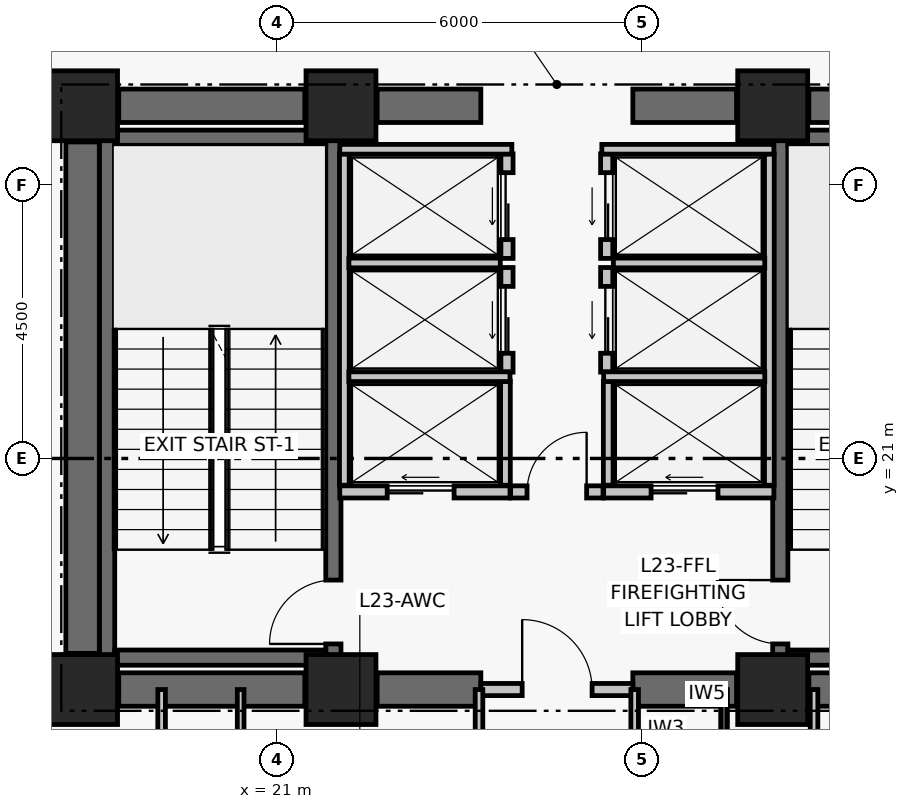
"""IFC4 building model, lengths in metres.
Left out: names, types, materials, properties, quantities, classifications, styles, units other than length and angle.
Written with IfcOpenShell. Run it as: python <this file> out.ifc"""

import sys

from ifc_helpers import new_model, si_unit, direction, frame, frame_2d, origin, origin_2d, place, context, subcontext, project, spatial, rectangle, extrude, element, fill, save


model = new_model("IFC4")
c1 = context("Model", 3, precision=1e-05, world=origin(), true_north=direction((0.0, 1.0)))
c2 = subcontext(c1, "Body", "Model", "MODEL_VIEW")
j1 = project(units=[si_unit("LENGTHUNIT", "METRE"), si_unit("PLANEANGLEUNIT", "RADIAN")], contexts=[c1])
p1 = place(None, origin())
s1 = spatial("IfcSite", under=j1, at=p1, CompositionType="ELEMENT")
p2 = place(p1, origin())
s2 = spatial("IfcBuilding", under=s1, at=p2, CompositionType="ELEMENT")
p3 = place(p2, frame((0.0, 0.0, 96.54)))
s3 = spatial("IfcBuildingStorey", under=s2, at=p3, CompositionType="ELEMENT", Elevation=96.54)
for number, where, z_axis, x_axis in (
    (1, (17.8, 17.2, 0.0), (0.0, 0.0, 1.0), (1.0, 0.0, 0.0)),
    (2, (22.05, 17.2, 0.0), (0.0, 0.0, 1.0), (1.0, 0.0, 0.0)),
    (3, (29.15, 17.2, 0.0), (0.0, 0.0, 1.0), (1.0, 0.0, 0.0)),
    (4, (17.8, 26.8, 0.0), (0.0, 0.0, 1.0), (1.0, 0.0, 0.0)),
    (5, (22.05, 26.8, 0.0), (0.0, 0.0, 1.0), (1.0, 0.0, 0.0)),
    (6, (29.15, 26.8, 0.0), (0.0, 0.0, 1.0), (1.0, 0.0, 0.0)),
):
    element("IfcColumn", number, at=place(p3, frame(where, z_axis=z_axis, x_axis=x_axis)), inside=s3, PredefinedType="COLUMN", context=c2, shape_type="SweptSolid", body=[
        extrude(rectangle(XDim=1.15, YDim=1.15, at=origin_2d()), origin(), (0.0, 0.0, 1.0), 3.72),
    ])
p4 = place(p3, frame((18.395, 17.2, 0.0), z_axis=(0.0, 0.0, 1.0), x_axis=(1.0, 0.0, 0.0)))
e7 = element("IfcWall", 7, at=p4, inside=s3, PredefinedType="SHEAR", context=c2, shape_type="SweptSolid", body=[
    extrude(rectangle(XDim=3.06, YDim=0.55, at=frame_2d((1.53, 0.0))), origin(), (0.0, 0.0, 1.0), 3.47),
])
p5 = place(p3, frame((22.645, 17.2, 0.0), z_axis=(0.0, 0.0, 1.0), x_axis=(1.0, 0.0, 0.0)))
e8 = element("IfcWall", 8, at=p5, inside=s3, PredefinedType="SHEAR", context=c2, shape_type="SweptSolid", body=[
    extrude(rectangle(XDim=1.705, YDim=0.55, at=frame_2d((0.853, 0.0))), origin(), (0.0, 0.0, 1.0), 3.47),
])
p6 = place(p3, frame((26.85, 17.2, 0.0), z_axis=(0.0, 0.0, 1.0), x_axis=(1.0, 0.0, 0.0)))
e9 = element("IfcWall", 9, at=p6, inside=s3, PredefinedType="SHEAR", context=c2, shape_type="SweptSolid", body=[
    extrude(rectangle(XDim=1.705, YDim=0.55, at=frame_2d((0.853, 0.0))), origin(), (0.0, 0.0, 1.0), 3.47),
])
p7 = place(p3, frame((29.745, 17.2, 0.0), z_axis=(0.0, 0.0, 1.0), x_axis=(1.0, 0.0, 0.0)))
e10 = element("IfcWall", 10, at=p7, inside=s3, PredefinedType="SHEAR", context=c2, shape_type="SweptSolid", body=[
    extrude(rectangle(XDim=3.06, YDim=0.55, at=frame_2d((1.53, 0.0))), origin(), (0.0, 0.0, 1.0), 3.47),
])
p8 = place(p3, frame((18.395, 26.8, 0.0), z_axis=(0.0, 0.0, 1.0), x_axis=(1.0, 0.0, 0.0)))
e11 = element("IfcWall", 11, at=p8, inside=s3, PredefinedType="SHEAR", context=c2, shape_type="SweptSolid", body=[
    extrude(rectangle(XDim=3.06, YDim=0.55, at=frame_2d((1.53, 0.0))), origin(), (0.0, 0.0, 1.0), 3.47),
])
p9 = place(p3, frame((22.645, 26.8, 0.0), z_axis=(0.0, 0.0, 1.0), x_axis=(1.0, 0.0, 0.0)))
e12 = element("IfcWall", 12, at=p9, inside=s3, PredefinedType="SHEAR", context=c2, shape_type="SweptSolid", body=[
    extrude(rectangle(XDim=1.705, YDim=0.55, at=frame_2d((0.853, 0.0))), origin(), (0.0, 0.0, 1.0), 3.47),
])
p10 = place(p3, frame((26.85, 26.8, 0.0), z_axis=(0.0, 0.0, 1.0), x_axis=(1.0, 0.0, 0.0)))
e13 = element("IfcWall", 13, at=p10, inside=s3, PredefinedType="SHEAR", context=c2, shape_type="SweptSolid", body=[
    extrude(rectangle(XDim=1.705, YDim=0.55, at=frame_2d((0.853, 0.0))), origin(), (0.0, 0.0, 1.0), 3.47),
])
p11 = place(p3, frame((29.745, 26.8, 0.0), z_axis=(0.0, 0.0, 1.0), x_axis=(1.0, 0.0, 0.0)))
e14 = element("IfcWall", 14, at=p11, inside=s3, PredefinedType="SHEAR", context=c2, shape_type="SweptSolid", body=[
    extrude(rectangle(XDim=3.06, YDim=0.55, at=frame_2d((1.53, 0.0))), origin(), (0.0, 0.0, 1.0), 3.47),
])
p12 = place(p3, frame((17.8, 17.795, 0.0), z_axis=(0.0, 0.0, 1.0), x_axis=(0.0, 1.0, 0.0)))
e15 = element("IfcWall", 15, at=p12, inside=s3, PredefinedType="SHEAR", context=c2, shape_type="SweptSolid", body=[
    extrude(rectangle(XDim=8.41, YDim=0.55, at=frame_2d((4.205, 0.0))), origin(), (0.0, 0.0, 1.0), 3.47),
])
p13 = place(p3, frame((18.204, 17.6, 0.0), z_axis=(0.0, 0.0, 1.0), x_axis=(0.0, 1.0, 0.0)))
e16 = element("IfcWall", 16, at=p13, inside=s3, PredefinedType="SHEAR", context=c2, shape_type="SweptSolid", body=[
    extrude(rectangle(XDim=8.8, YDim=0.25, at=frame_2d((4.4, 0.0))), origin(), (0.0, 0.0, 1.0), 3.47),
])
p14 = place(p3, frame((21.925, 17.6, 0.0), z_axis=(0.0, 0.0, 1.0), x_axis=(0.0, 1.0, 0.0)))
e17 = element("IfcWall", 17, at=p14, inside=s3, PredefinedType="SHEAR", context=c2, shape_type="SweptSolid", body=[
    extrude(rectangle(XDim=8.8, YDim=0.25, at=frame_2d((4.4, 0.0))), origin(), (0.0, 0.0, 1.0), 3.47),
])
p15 = place(p14, frame((0.35, 0.0, 0.0)))
e18 = element("IfcOpeningElement", 18, at=p15, cuts=e17, PredefinedType="OPENING", context=c2, shape_type="SweptSolid", body=[
    extrude(rectangle(XDim=1.05, YDim=2.08, at=frame_2d((0.525, 1.04))), frame((0.0, 0.135, 0.0), z_axis=(0.0, -1.0, 0.0), x_axis=(1.0, 0.0, 0.0)), (0.0, 0.0, 1.0), 0.27),
])
for number, where, z_axis, x_axis in (
    (19, (18.329, 17.725, 0.0), (0.0, 0.0, 1.0), (1.0, 0.0, 0.0)),
    (20, (18.329, 26.275, 0.0), (0.0, 0.0, 1.0), (1.0, 0.0, 0.0)),
):
    element("IfcWall", number, at=place(p3, frame(where, z_axis=z_axis, x_axis=x_axis)), inside=s3, PredefinedType="SHEAR", context=c2, shape_type="SweptSolid", body=[
        extrude(rectangle(XDim=3.471, YDim=0.25, at=frame_2d((1.735, 0.0))), origin(), (0.0, 0.0, 1.0), 3.47),
    ])
p16 = place(p3, frame((29.275, 17.6, 0.0), z_axis=(0.0, 0.0, 1.0), x_axis=(0.0, 1.0, 0.0)))
e21 = element("IfcWall", 21, at=p16, inside=s3, PredefinedType="SHEAR", context=c2, shape_type="SweptSolid", body=[
    extrude(rectangle(XDim=8.8, YDim=0.25, at=frame_2d((4.4, 0.0))), origin(), (0.0, 0.0, 1.0), 3.47),
])
p17 = place(p16, frame((0.35, 0.0, 0.0)))
e22 = element("IfcOpeningElement", 22, at=p17, cuts=e21, PredefinedType="OPENING", context=c2, shape_type="SweptSolid", body=[
    extrude(rectangle(XDim=1.05, YDim=2.08, at=frame_2d((0.525, 1.04))), frame((0.0, 0.135, 0.0), z_axis=(0.0, -1.0, 0.0), x_axis=(1.0, 0.0, 0.0)), (0.0, 0.0, 1.0), 0.27),
])
for number, where, z_axis, x_axis in (
    (23, (29.4, 17.725, 0.0), (0.0, 0.0, 1.0), (1.0, 0.0, 0.0)),
    (24, (29.4, 26.275, 0.0), (0.0, 0.0, 1.0), (1.0, 0.0, 0.0)),
):
    element("IfcWall", number, at=place(p3, frame(where, z_axis=z_axis, x_axis=x_axis)), inside=s3, PredefinedType="SHEAR", context=c2, shape_type="SweptSolid", body=[
        extrude(rectangle(XDim=3.471, YDim=0.25, at=frame_2d((1.736, 0.0))), origin(), (0.0, 0.0, 1.0), 3.47),
    ])
p18 = place(p3, frame((24.35, 17.2, 0.0), z_axis=(0.0, 0.0, 1.0), x_axis=(1.0, 0.0, 0.0)))
e25 = element("IfcWall", 25, at=p18, inside=s3, PredefinedType="PARTITIONING", context=c2, shape_type="SweptSolid", body=[
    extrude(rectangle(XDim=2.5, YDim=0.2, at=frame_2d((1.25, 0.0))), origin(), (0.0, 0.0, 1.0), 2.6),
])
p19 = place(p18, frame((0.68, 0.0, 0.0)))
e26 = element("IfcOpeningElement", 26, at=p19, cuts=e25, PredefinedType="OPENING", context=c2, shape_type="SweptSolid", body=[
    extrude(rectangle(XDim=1.15, YDim=2.08, at=frame_2d((0.575, 1.04))), frame((0.0, 0.11, 0.0), z_axis=(0.0, -1.0, 0.0), x_axis=(1.0, 0.0, 0.0)), (0.0, 0.0, 1.0), 0.22),
])
p20 = place(p3, frame((24.84, 20.45, 0.0), z_axis=(0.0, 0.0, 1.0), x_axis=(1.0, 0.0, 0.0)))
e27 = element("IfcWall", 27, at=p20, inside=s3, PredefinedType="PARTITIONING", context=c2, shape_type="SweptSolid", body=[
    extrude(rectangle(XDim=1.52, YDim=0.2, at=frame_2d((0.76, 0.0))), origin(), (0.0, 0.0, 1.0), 3.47),
])
p21 = place(p20, frame((0.27, 0.0, 0.0)))
e28 = element("IfcOpeningElement", 28, at=p21, cuts=e27, PredefinedType="OPENING", context=c2, shape_type="SweptSolid", body=[
    extrude(rectangle(XDim=0.98, YDim=2.06, at=frame_2d((0.49, 1.03))), frame((0.0, 0.11, 0.0), z_axis=(0.0, -1.0, 0.0), x_axis=(1.0, 0.0, 0.0)), (0.0, 0.0, 1.0), 0.22),
])
p22 = place(p3, frame((22.03, 20.45, 0.0), z_axis=(0.0, 0.0, 1.0), x_axis=(1.0, 0.0, 0.0)))
e29 = element("IfcWall", 29, at=p22, inside=s3, PredefinedType="PARTITIONING", context=c2, shape_type="SweptSolid", body=[
    extrude(rectangle(XDim=2.8, YDim=0.2, at=frame_2d((1.4, 0.0))), origin(), (0.0, 0.0, 1.0), 3.47),
])
p23 = place(p22, frame((0.78, 0.0, 0.0)))
e30 = element("IfcOpeningElement", 30, at=p23, cuts=e29, PredefinedType="OPENING", context=c2, shape_type="SweptSolid", body=[
    extrude(rectangle(XDim=1.1, YDim=2.08, at=frame_2d((0.55, 1.04))), frame((0.0, 0.11, 0.0), z_axis=(0.0, -1.0, 0.0), x_axis=(1.0, 0.0, 0.0)), (0.0, 0.0, 1.0), 0.22),
])
p24 = place(p3, frame((26.37, 20.45, 0.0), z_axis=(0.0, 0.0, 1.0), x_axis=(1.0, 0.0, 0.0)))
e31 = element("IfcWall", 31, at=p24, inside=s3, PredefinedType="PARTITIONING", context=c2, shape_type="SweptSolid", body=[
    extrude(rectangle(XDim=2.8, YDim=0.2, at=frame_2d((1.4, 0.0))), origin(), (0.0, 0.0, 1.0), 3.47),
])
p25 = place(p24, frame((0.78, 0.0, 0.0)))
e32 = element("IfcOpeningElement", 32, at=p25, cuts=e31, PredefinedType="OPENING", context=c2, shape_type="SweptSolid", body=[
    extrude(rectangle(XDim=1.1, YDim=2.08, at=frame_2d((0.55, 1.04))), frame((0.0, 0.11, 0.0), z_axis=(0.0, -1.0, 0.0), x_axis=(1.0, 0.0, 0.0)), (0.0, 0.0, 1.0), 0.22),
])
p26 = place(p3, frame((24.78, 22.42, 0.0), z_axis=(0.0, 0.0, 1.0), x_axis=(0.0, 1.0, 0.0)))
e33 = element("IfcWall", 33, at=p26, inside=s3, PredefinedType="PARTITIONING", context=c2, shape_type="SweptSolid", body=[
    extrude(rectangle(XDim=1.72, YDim=0.2, at=frame_2d((0.86, 0.0))), origin(), (0.0, 0.0, 1.0), 3.47),
])
p27 = place(p26, frame((0.31, 0.0, 0.0)))
e34 = element("IfcOpeningElement", 34, at=p27, cuts=e33, PredefinedType="OPENING", context=c2, shape_type="SweptSolid", body=[
    extrude(rectangle(XDim=1.1, YDim=2.08, at=frame_2d((0.55, 1.04))), frame((0.0, 0.11, 0.0), z_axis=(0.0, -1.0, 0.0), x_axis=(1.0, 0.0, 0.0)), (0.0, 0.0, 1.0), 0.22),
])
p28 = place(p3, frame((24.78, 24.29, 0.0), z_axis=(0.0, 0.0, 1.0), x_axis=(0.0, 1.0, 0.0)))
e35 = element("IfcWall", 35, at=p28, inside=s3, PredefinedType="PARTITIONING", context=c2, shape_type="SweptSolid", body=[
    extrude(rectangle(XDim=1.72, YDim=0.2, at=frame_2d((0.86, 0.0))), origin(), (0.0, 0.0, 1.0), 3.47),
])
p29 = place(p28, frame((0.31, 0.0, 0.0)))
e36 = element("IfcOpeningElement", 36, at=p29, cuts=e35, PredefinedType="OPENING", context=c2, shape_type="SweptSolid", body=[
    extrude(rectangle(XDim=1.1, YDim=2.08, at=frame_2d((0.55, 1.04))), frame((0.0, 0.11, 0.0), z_axis=(0.0, -1.0, 0.0), x_axis=(1.0, 0.0, 0.0)), (0.0, 0.0, 1.0), 0.22),
])
p30 = place(p3, frame((26.42, 22.42, 0.0), z_axis=(0.0, 0.0, 1.0), x_axis=(0.0, 1.0, 0.0)))
e37 = element("IfcWall", 37, at=p30, inside=s3, PredefinedType="PARTITIONING", context=c2, shape_type="SweptSolid", body=[
    extrude(rectangle(XDim=1.72, YDim=0.2, at=frame_2d((0.86, 0.0))), origin(), (0.0, 0.0, 1.0), 3.47),
])
p31 = place(p30, frame((0.31, 0.0, 0.0)))
e38 = element("IfcOpeningElement", 38, at=p31, cuts=e37, PredefinedType="OPENING", context=c2, shape_type="SweptSolid", body=[
    extrude(rectangle(XDim=1.1, YDim=2.08, at=frame_2d((0.55, 1.04))), frame((0.0, 0.11, 0.0), z_axis=(0.0, -1.0, 0.0), x_axis=(1.0, 0.0, 0.0)), (0.0, 0.0, 1.0), 0.22),
])
p32 = place(p3, frame((26.42, 24.29, 0.0), z_axis=(0.0, 0.0, 1.0), x_axis=(0.0, 1.0, 0.0)))
e39 = element("IfcWall", 39, at=p32, inside=s3, PredefinedType="PARTITIONING", context=c2, shape_type="SweptSolid", body=[
    extrude(rectangle(XDim=1.72, YDim=0.2, at=frame_2d((0.86, 0.0))), origin(), (0.0, 0.0, 1.0), 3.47),
])
p33 = place(p32, frame((0.31, 0.0, 0.0)))
e40 = element("IfcOpeningElement", 40, at=p33, cuts=e39, PredefinedType="OPENING", context=c2, shape_type="SweptSolid", body=[
    extrude(rectangle(XDim=1.1, YDim=2.08, at=frame_2d((0.55, 1.04))), frame((0.0, 0.11, 0.0), z_axis=(0.0, -1.0, 0.0), x_axis=(1.0, 0.0, 0.0)), (0.0, 0.0, 1.0), 0.22),
])
p34 = place(p3, frame((22.105, 20.56, 0.0), z_axis=(0.0, 0.0, 1.0), x_axis=(0.0, 1.0, 0.0)))
e41 = element("IfcWall", 41, at=p34, inside=s3, PredefinedType="PARTITIONING", context=c2, shape_type="SweptSolid", body=[
    extrude(rectangle(XDim=5.45, YDim=0.16, at=frame_2d((2.725, 0.0))), origin(), (0.0, 0.0, 1.0), 3.47),
])
p35 = place(p3, frame((24.755, 20.56, 0.0), z_axis=(0.0, 0.0, 1.0), x_axis=(0.0, 1.0, 0.0)))
e42 = element("IfcWall", 42, at=p35, inside=s3, PredefinedType="PARTITIONING", context=c2, shape_type="SweptSolid", body=[
    extrude(rectangle(XDim=1.71, YDim=0.16, at=frame_2d((0.855, 0.0))), origin(), (0.0, 0.0, 1.0), 3.47),
])
p36 = place(p3, frame((22.18, 22.345, 0.0), z_axis=(0.0, 0.0, 1.0), x_axis=(1.0, 0.0, 0.0)))
e43 = element("IfcWall", 43, at=p36, inside=s3, PredefinedType="PARTITIONING", context=c2, shape_type="SweptSolid", body=[
    extrude(rectangle(XDim=2.65, YDim=0.16, at=frame_2d((1.325, 0.0))), origin(), (0.0, 0.0, 1.0), 3.47),
])
p37 = place(p3, frame((22.18, 24.215, 0.0), z_axis=(0.0, 0.0, 1.0), x_axis=(1.0, 0.0, 0.0)))
e44 = element("IfcWall", 44, at=p37, inside=s3, PredefinedType="PARTITIONING", context=c2, shape_type="SweptSolid", body=[
    extrude(rectangle(XDim=2.49, YDim=0.16, at=frame_2d((1.245, 0.0))), origin(), (0.0, 0.0, 1.0), 3.47),
])
p38 = place(p3, frame((22.03, 26.085, 0.0), z_axis=(0.0, 0.0, 1.0), x_axis=(1.0, 0.0, 0.0)))
e45 = element("IfcWall", 45, at=p38, inside=s3, PredefinedType="PARTITIONING", context=c2, shape_type="SweptSolid", body=[
    extrude(rectangle(XDim=2.83, YDim=0.16, at=frame_2d((1.415, 0.0))), origin(), (0.0, 0.0, 1.0), 3.47),
])
p39 = place(p3, frame((29.095, 20.56, 0.0), z_axis=(0.0, 0.0, 1.0), x_axis=(0.0, 1.0, 0.0)))
e46 = element("IfcWall", 46, at=p39, inside=s3, PredefinedType="PARTITIONING", context=c2, shape_type="SweptSolid", body=[
    extrude(rectangle(XDim=5.45, YDim=0.16, at=frame_2d((2.725, 0.0))), origin(), (0.0, 0.0, 1.0), 3.47),
])
p40 = place(p3, frame((26.445, 20.56, 0.0), z_axis=(0.0, 0.0, 1.0), x_axis=(0.0, 1.0, 0.0)))
e47 = element("IfcWall", 47, at=p40, inside=s3, PredefinedType="PARTITIONING", context=c2, shape_type="SweptSolid", body=[
    extrude(rectangle(XDim=1.71, YDim=0.16, at=frame_2d((0.855, 0.0))), origin(), (0.0, 0.0, 1.0), 3.47),
])
p41 = place(p3, frame((26.37, 22.345, 0.0), z_axis=(0.0, 0.0, 1.0), x_axis=(1.0, 0.0, 0.0)))
e48 = element("IfcWall", 48, at=p41, inside=s3, PredefinedType="PARTITIONING", context=c2, shape_type="SweptSolid", body=[
    extrude(rectangle(XDim=2.65, YDim=0.16, at=frame_2d((1.325, 0.0))), origin(), (0.0, 0.0, 1.0), 3.47),
])
p42 = place(p3, frame((26.53, 24.215, 0.0), z_axis=(0.0, 0.0, 1.0), x_axis=(1.0, 0.0, 0.0)))
e49 = element("IfcWall", 49, at=p42, inside=s3, PredefinedType="PARTITIONING", context=c2, shape_type="SweptSolid", body=[
    extrude(rectangle(XDim=2.49, YDim=0.16, at=frame_2d((1.245, 0.0))), origin(), (0.0, 0.0, 1.0), 3.47),
])
p43 = place(p3, frame((26.34, 26.085, 0.0), z_axis=(0.0, 0.0, 1.0), x_axis=(1.0, 0.0, 0.0)))
e50 = element("IfcWall", 50, at=p43, inside=s3, PredefinedType="PARTITIONING", context=c2, shape_type="SweptSolid", body=[
    extrude(rectangle(XDim=2.83, YDim=0.16, at=frame_2d((1.415, 0.0))), origin(), (0.0, 0.0, 1.0), 3.47),
])
p44 = place(p3, frame((19.1, 14.95, 0.0), z_axis=(0.0, 0.0, 1.0), x_axis=(0.0, 1.0, 0.0)))
e51 = element("IfcWall", 51, at=p44, inside=s3, PredefinedType="PARTITIONING", context=c2, shape_type="SweptSolid", body=[
    extrude(rectangle(XDim=2.25, YDim=0.125, at=frame_2d((1.125, 0.0))), origin(), (0.0, 0.0, 1.0), 2.6),
])
p45 = place(p3, frame((20.4, 14.95, 0.0), z_axis=(0.0, 0.0, 1.0), x_axis=(0.0, 1.0, 0.0)))
e52 = element("IfcWall", 52, at=p45, inside=s3, PredefinedType="PARTITIONING", context=c2, shape_type="SweptSolid", body=[
    extrude(rectangle(XDim=2.25, YDim=0.11, at=frame_2d((1.125, 0.0))), origin(), (0.0, 0.0, 1.0), 2.6),
])
for number, where, z_axis, x_axis in (
    (53, (24.32, 14.95, 0.0), (0.0, 0.0, 1.0), (0.0, 1.0, 0.0)),
    (54, (26.88, 14.95, 0.0), (0.0, 0.0, 1.0), (0.0, 1.0, 0.0)),
):
    element("IfcWall", number, at=place(p3, frame(where, z_axis=z_axis, x_axis=x_axis)), inside=s3, PredefinedType="PARTITIONING", context=c2, shape_type="SweptSolid", body=[
        extrude(rectangle(XDim=2.25, YDim=0.125, at=frame_2d((1.125, 0.0))), origin(), (0.0, 0.0, 1.0), 2.6),
    ])
p46 = place(p3, frame((28.35, 14.95, 0.0), z_axis=(0.0, 0.0, 1.0), x_axis=(0.0, 1.0, 0.0)))
e55 = element("IfcWall", 55, at=p46, inside=s3, PredefinedType="PARTITIONING", context=c2, shape_type="SweptSolid", body=[
    extrude(rectangle(XDim=2.25, YDim=0.11, at=frame_2d((1.125, 0.0))), origin(), (0.0, 0.0, 1.0), 2.6),
])
p47 = place(p3, frame((29.83, 14.95, 0.0), z_axis=(0.0, 0.0, 1.0), x_axis=(0.0, 1.0, 0.0)))
e56 = element("IfcWall", 56, at=p47, inside=s3, PredefinedType="PARTITIONING", context=c2, shape_type="SweptSolid", body=[
    extrude(rectangle(XDim=2.25, YDim=0.125, at=frame_2d((1.125, 0.0))), origin(), (0.0, 0.0, 1.0), 2.6),
])
p48 = place(p15, origin())
e57 = element("IfcDoor", 57, at=p48, inside=s3, OperationType="SINGLE_SWING_LEFT", PredefinedType="DOOR", context=c2, shape_type="SweptSolid", body=[
    extrude(rectangle(XDim=1.05, YDim=2.08, at=frame_2d((0.525, 1.04))), frame((0.0, 0.025, 0.0), z_axis=(0.0, -1.0, 0.0), x_axis=(1.0, 0.0, 0.0)), (0.0, 0.0, 1.0), 0.05),
])
fill(e18, e57)
p49 = place(p17, origin())
e58 = element("IfcDoor", 58, at=p49, inside=s3, OperationType="SINGLE_SWING_RIGHT", PredefinedType="DOOR", context=c2, shape_type="SweptSolid", body=[
    extrude(rectangle(XDim=1.05, YDim=2.08, at=frame_2d((0.525, 1.04))), frame((0.0, 0.025, 0.0), z_axis=(0.0, -1.0, 0.0), x_axis=(1.0, 0.0, 0.0)), (0.0, 0.0, 1.0), 0.05),
])
fill(e22, e58)
p50 = place(p19, origin())
e59 = element("IfcDoor", 59, at=p50, inside=s3, OperationType="SINGLE_SWING_LEFT", PredefinedType="DOOR", context=c2, shape_type="SweptSolid", body=[
    extrude(rectangle(XDim=1.15, YDim=2.08, at=frame_2d((0.575, 1.04))), frame((0.0, 0.025, 0.0), z_axis=(0.0, -1.0, 0.0), x_axis=(1.0, 0.0, 0.0)), (0.0, 0.0, 1.0), 0.05),
])
fill(e26, e59)
p51 = place(p21, origin())
e60 = element("IfcDoor", 60, at=p51, inside=s3, OperationType="SINGLE_SWING_RIGHT", PredefinedType="DOOR", context=c2, shape_type="SweptSolid", body=[
    extrude(rectangle(XDim=0.98, YDim=2.06, at=frame_2d((0.49, 1.03))), frame((0.0, 0.025, 0.0), z_axis=(0.0, -1.0, 0.0), x_axis=(1.0, 0.0, 0.0)), (0.0, 0.0, 1.0), 0.05),
])
fill(e28, e60)
p52 = place(p23, origin())
e61 = element("IfcDoor", 61, at=p52, inside=s3, OperationType="DOUBLE_DOOR_SLIDING", PredefinedType="DOOR", context=c2, shape_type="SweptSolid", body=[
    extrude(rectangle(XDim=1.1, YDim=2.08, at=frame_2d((0.55, 1.04))), frame((0.0, 0.025, 0.0), z_axis=(0.0, -1.0, 0.0), x_axis=(1.0, 0.0, 0.0)), (0.0, 0.0, 1.0), 0.05),
])
fill(e30, e61)
p53 = place(p25, origin())
e62 = element("IfcDoor", 62, at=p53, inside=s3, OperationType="DOUBLE_DOOR_SLIDING", PredefinedType="DOOR", context=c2, shape_type="SweptSolid", body=[
    extrude(rectangle(XDim=1.1, YDim=2.08, at=frame_2d((0.55, 1.04))), frame((0.0, 0.025, 0.0), z_axis=(0.0, -1.0, 0.0), x_axis=(1.0, 0.0, 0.0)), (0.0, 0.0, 1.0), 0.05),
])
fill(e32, e62)
p54 = place(p27, origin())
e63 = element("IfcDoor", 63, at=p54, inside=s3, OperationType="DOUBLE_DOOR_SLIDING", PredefinedType="DOOR", context=c2, shape_type="SweptSolid", body=[
    extrude(rectangle(XDim=1.1, YDim=2.08, at=frame_2d((0.55, 1.04))), frame((0.0, 0.025, 0.0), z_axis=(0.0, -1.0, 0.0), x_axis=(1.0, 0.0, 0.0)), (0.0, 0.0, 1.0), 0.05),
])
fill(e34, e63)
p55 = place(p29, origin())
e64 = element("IfcDoor", 64, at=p55, inside=s3, OperationType="DOUBLE_DOOR_SLIDING", PredefinedType="DOOR", context=c2, shape_type="SweptSolid", body=[
    extrude(rectangle(XDim=1.1, YDim=2.08, at=frame_2d((0.55, 1.04))), frame((0.0, 0.025, 0.0), z_axis=(0.0, -1.0, 0.0), x_axis=(1.0, 0.0, 0.0)), (0.0, 0.0, 1.0), 0.05),
])
fill(e36, e64)
p56 = place(p31, origin())
e65 = element("IfcDoor", 65, at=p56, inside=s3, OperationType="DOUBLE_DOOR_SLIDING", PredefinedType="DOOR", context=c2, shape_type="SweptSolid", body=[
    extrude(rectangle(XDim=1.1, YDim=2.08, at=frame_2d((0.55, 1.04))), frame((0.0, 0.025, 0.0), z_axis=(0.0, -1.0, 0.0), x_axis=(1.0, 0.0, 0.0)), (0.0, 0.0, 1.0), 0.05),
])
fill(e38, e65)
p57 = place(p33, origin())
e66 = element("IfcDoor", 66, at=p57, inside=s3, OperationType="DOUBLE_DOOR_SLIDING", PredefinedType="DOOR", context=c2, shape_type="SweptSolid", body=[
    extrude(rectangle(XDim=1.1, YDim=2.08, at=frame_2d((0.55, 1.04))), frame((0.0, 0.025, 0.0), z_axis=(0.0, -1.0, 0.0), x_axis=(1.0, 0.0, 0.0)), (0.0, 0.0, 1.0), 0.05),
])
fill(e40, e66)
save(model, sys.argv[1])
